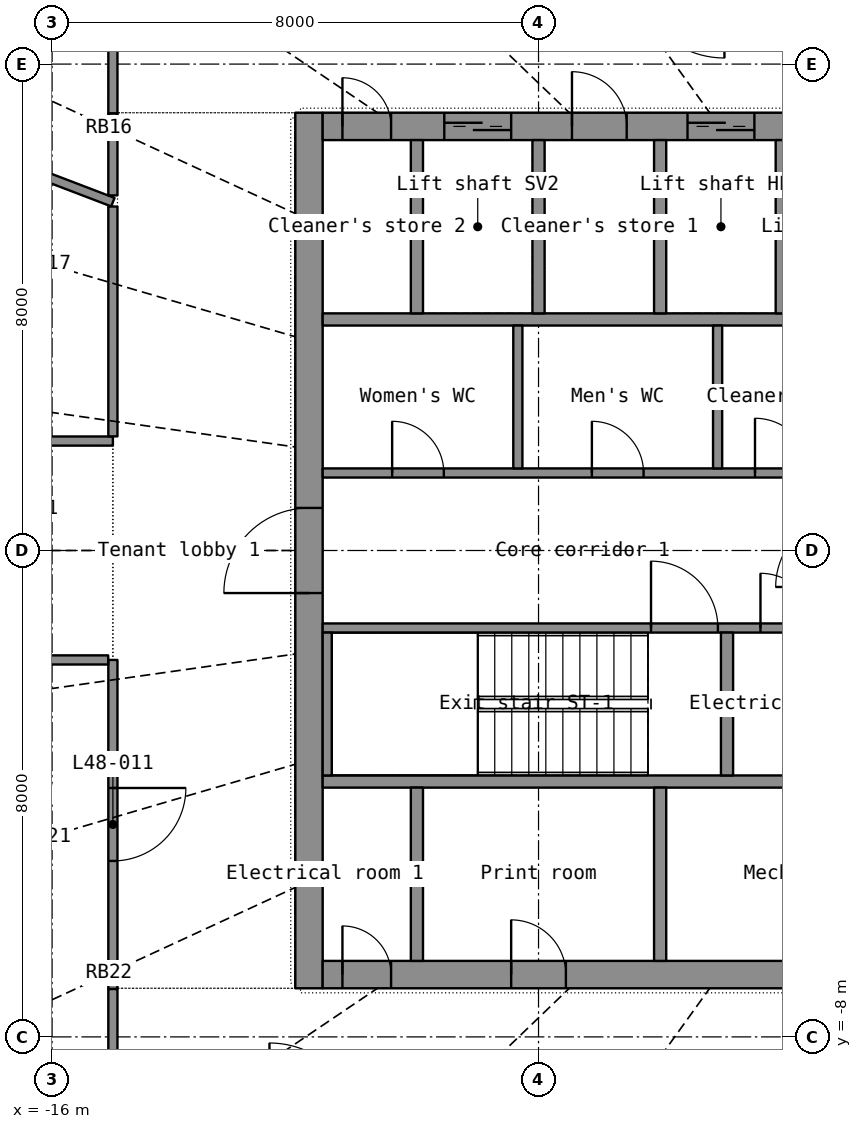
"""IFC4 building model, lengths in metres.
Left out: names, types, materials, properties, quantities, classifications, styles, units other than length and angle.
Written with IfcOpenShell. Run it as: python <this file> out.ifc"""

import sys

from ifc_helpers import new_model, si_unit, direction, frame, frame_2d, origin, place, context, subcontext, project, spatial, rectangle, extrude, element, fill, save


model = new_model("IFC4")
c1 = context("Model", 3, precision=1e-05, world=origin(), true_north=direction((0.0, 1.0)))
c2 = subcontext(c1, "Body", "Model", "MODEL_VIEW")
j1 = project(units=[si_unit("LENGTHUNIT", "METRE"), si_unit("PLANEANGLEUNIT", "RADIAN")], contexts=[c1])
p1 = place(None, origin())
s1 = spatial("IfcSite", under=j1, at=p1, CompositionType="ELEMENT")
p2 = place(p1, origin())
s2 = spatial("IfcBuilding", under=s1, at=p2, CompositionType="ELEMENT")
p3 = place(p2, frame((0.0, 0.0, 197.8)))
s3 = spatial("IfcBuildingStorey", under=s2, at=p3, CompositionType="ELEMENT", Elevation=197.8)
p4 = place(p3, frame((-11.775, -7.2, 0.0), z_axis=(0.0, 0.0, 1.0), x_axis=(0.0, 1.0, 0.0)))
e1 = element("IfcWall", 1, at=p4, inside=s3, PredefinedType="SHEAR", context=c2, shape_type="SweptSolid", body=[
    extrude(rectangle(XDim=14.4, YDim=0.45, at=frame_2d((7.2, 0.0))), origin(), (0.0, 0.0, 1.0), 3.3),
])
p5 = place(p4, frame((6.5, 0.0, 0.0)))
e2 = element("IfcOpeningElement", 2, at=p5, cuts=e1, PredefinedType="OPENING", context=c2, shape_type="SweptSolid", body=[
    extrude(rectangle(XDim=1.4, YDim=2.2, at=frame_2d((0.7, 1.1))), frame((0.0, 0.235, 0.0), z_axis=(0.0, -1.0, 0.0), x_axis=(1.0, 0.0, 0.0)), (0.0, 0.0, 1.0), 0.47),
])
p6 = place(p3, frame((-11.55, -6.975, 0.0), z_axis=(0.0, 0.0, 1.0), x_axis=(1.0, 0.0, 0.0)))
e3 = element("IfcWall", 3, at=p6, inside=s3, PredefinedType="SHEAR", context=c2, shape_type="SweptSolid", body=[
    extrude(rectangle(XDim=23.1, YDim=0.45, at=frame_2d((11.55, 0.0))), origin(), (0.0, 0.0, 1.0), 3.3),
])
p7 = place(p6, frame((20.0, 0.0, 0.0)))
e4 = element("IfcOpeningElement", 4, at=p7, cuts=e3, PredefinedType="OPENING", context=c2, shape_type="SweptSolid", body=[
    extrude(rectangle(XDim=1.1, YDim=2.2, at=frame_2d((0.55, 1.1))), frame((0.0, 0.235, 0.0), z_axis=(0.0, -1.0, 0.0), x_axis=(1.0, 0.0, 0.0)), (0.0, 0.0, 1.0), 0.47),
])
p8 = place(p6, frame((3.1, 0.0, 0.0)))
e5 = element("IfcOpeningElement", 5, at=p8, cuts=e3, PredefinedType="OPENING", context=c2, shape_type="SweptSolid", body=[
    extrude(rectangle(XDim=0.9, YDim=2.1, at=frame_2d((0.45, 1.05))), frame((0.0, 0.235, 0.0), z_axis=(0.0, -1.0, 0.0), x_axis=(1.0, 0.0, 0.0)), (0.0, 0.0, 1.0), 0.47),
])
p9 = place(p6, frame((8.1, 0.0, 0.0)))
e6 = element("IfcOpeningElement", 6, at=p9, cuts=e3, PredefinedType="OPENING", context=c2, shape_type="SweptSolid", body=[
    extrude(rectangle(XDim=0.9, YDim=2.1, at=frame_2d((0.45, 1.05))), frame((0.0, 0.235, 0.0), z_axis=(0.0, -1.0, 0.0), x_axis=(1.0, 0.0, 0.0)), (0.0, 0.0, 1.0), 0.47),
])
p10 = place(p6, frame((15.1, 0.0, 0.0)))
e7 = element("IfcOpeningElement", 7, at=p10, cuts=e3, PredefinedType="OPENING", context=c2, shape_type="SweptSolid", body=[
    extrude(rectangle(XDim=0.9, YDim=2.1, at=frame_2d((0.45, 1.05))), frame((0.0, 0.235, 0.0), z_axis=(0.0, -1.0, 0.0), x_axis=(1.0, 0.0, 0.0)), (0.0, 0.0, 1.0), 0.47),
])
p11 = place(p6, frame((0.325, 0.0, 0.0)))
e8 = element("IfcOpeningElement", 8, at=p11, cuts=e3, PredefinedType="OPENING", context=c2, shape_type="SweptSolid", body=[
    extrude(rectangle(XDim=0.8, YDim=2.05, at=frame_2d((0.4, 1.025))), frame((0.0, 0.235, 0.0), z_axis=(0.0, -1.0, 0.0), x_axis=(1.0, 0.0, 0.0)), (0.0, 0.0, 1.0), 0.47),
])
p12 = place(p6, frame((21.975, 0.0, 0.0)))
e9 = element("IfcOpeningElement", 9, at=p12, cuts=e3, PredefinedType="OPENING", context=c2, shape_type="SweptSolid", body=[
    extrude(rectangle(XDim=0.8, YDim=2.05, at=frame_2d((0.4, 1.025))), frame((0.0, 0.235, 0.0), z_axis=(0.0, -1.0, 0.0), x_axis=(1.0, 0.0, 0.0)), (0.0, 0.0, 1.0), 0.47),
])
p13 = place(p3, frame((-11.55, 6.975, 0.0), z_axis=(0.0, 0.0, 1.0), x_axis=(1.0, 0.0, 0.0)))
e10 = element("IfcWall", 10, at=p13, inside=s3, PredefinedType="SHEAR", context=c2, shape_type="SweptSolid", body=[
    extrude(rectangle(XDim=23.1, YDim=0.45, at=frame_2d((11.55, 0.0))), origin(), (0.0, 0.0, 1.0), 3.3),
])
p14 = place(p13, frame((2.0, 0.0, 0.0)))
e11 = element("IfcOpeningElement", 11, at=p14, cuts=e10, PredefinedType="OPENING", context=c2, shape_type="SweptSolid", body=[
    extrude(rectangle(XDim=1.1, YDim=2.2, at=frame_2d((0.55, 1.1))), frame((0.0, 0.235, 0.0), z_axis=(0.0, -1.0, 0.0), x_axis=(1.0, 0.0, 0.0)), (0.0, 0.0, 1.0), 0.47),
])
p15 = place(p13, frame((6.0, 0.0, 0.0)))
e12 = element("IfcOpeningElement", 12, at=p15, cuts=e10, PredefinedType="OPENING", context=c2, shape_type="SweptSolid", body=[
    extrude(rectangle(XDim=1.1, YDim=2.2, at=frame_2d((0.55, 1.1))), frame((0.0, 0.235, 0.0), z_axis=(0.0, -1.0, 0.0), x_axis=(1.0, 0.0, 0.0)), (0.0, 0.0, 1.0), 0.47),
])
p16 = place(p13, frame((8.0, 0.0, 0.0)))
e13 = element("IfcOpeningElement", 13, at=p16, cuts=e10, PredefinedType="OPENING", context=c2, shape_type="SweptSolid", body=[
    extrude(rectangle(XDim=1.1, YDim=2.2, at=frame_2d((0.55, 1.1))), frame((0.0, 0.235, 0.0), z_axis=(0.0, -1.0, 0.0), x_axis=(1.0, 0.0, 0.0)), (0.0, 0.0, 1.0), 0.47),
])
p17 = place(p13, frame((10.0, 0.0, 0.0)))
e14 = element("IfcOpeningElement", 14, at=p17, cuts=e10, PredefinedType="OPENING", context=c2, shape_type="SweptSolid", body=[
    extrude(rectangle(XDim=1.1, YDim=2.2, at=frame_2d((0.55, 1.1))), frame((0.0, 0.235, 0.0), z_axis=(0.0, -1.0, 0.0), x_axis=(1.0, 0.0, 0.0)), (0.0, 0.0, 1.0), 0.47),
])
p18 = place(p13, frame((12.0, 0.0, 0.0)))
e15 = element("IfcOpeningElement", 15, at=p18, cuts=e10, PredefinedType="OPENING", context=c2, shape_type="SweptSolid", body=[
    extrude(rectangle(XDim=1.1, YDim=2.2, at=frame_2d((0.55, 1.1))), frame((0.0, 0.235, 0.0), z_axis=(0.0, -1.0, 0.0), x_axis=(1.0, 0.0, 0.0)), (0.0, 0.0, 1.0), 0.47),
])
p19 = place(p13, frame((14.0, 0.0, 0.0)))
e16 = element("IfcOpeningElement", 16, at=p19, cuts=e10, PredefinedType="OPENING", context=c2, shape_type="SweptSolid", body=[
    extrude(rectangle(XDim=1.1, YDim=2.2, at=frame_2d((0.55, 1.1))), frame((0.0, 0.235, 0.0), z_axis=(0.0, -1.0, 0.0), x_axis=(1.0, 0.0, 0.0)), (0.0, 0.0, 1.0), 0.47),
])
p20 = place(p13, frame((16.0, 0.0, 0.0)))
e17 = element("IfcOpeningElement", 17, at=p20, cuts=e10, PredefinedType="OPENING", context=c2, shape_type="SweptSolid", body=[
    extrude(rectangle(XDim=1.1, YDim=2.2, at=frame_2d((0.55, 1.1))), frame((0.0, 0.235, 0.0), z_axis=(0.0, -1.0, 0.0), x_axis=(1.0, 0.0, 0.0)), (0.0, 0.0, 1.0), 0.47),
])
p21 = place(p13, frame((18.0, 0.0, 0.0)))
e18 = element("IfcOpeningElement", 18, at=p21, cuts=e10, PredefinedType="OPENING", context=c2, shape_type="SweptSolid", body=[
    extrude(rectangle(XDim=1.1, YDim=2.2, at=frame_2d((0.55, 1.1))), frame((0.0, 0.235, 0.0), z_axis=(0.0, -1.0, 0.0), x_axis=(1.0, 0.0, 0.0)), (0.0, 0.0, 1.0), 0.47),
])
p22 = place(p13, frame((20.0, 0.0, 0.0)))
e19 = element("IfcOpeningElement", 19, at=p22, cuts=e10, PredefinedType="OPENING", context=c2, shape_type="SweptSolid", body=[
    extrude(rectangle(XDim=1.1, YDim=2.2, at=frame_2d((0.55, 1.1))), frame((0.0, 0.235, 0.0), z_axis=(0.0, -1.0, 0.0), x_axis=(1.0, 0.0, 0.0)), (0.0, 0.0, 1.0), 0.47),
])
p23 = place(p13, frame((4.1, 0.0, 0.0)))
e20 = element("IfcOpeningElement", 20, at=p23, cuts=e10, PredefinedType="OPENING", context=c2, shape_type="SweptSolid", body=[
    extrude(rectangle(XDim=0.9, YDim=2.1, at=frame_2d((0.45, 1.05))), frame((0.0, 0.235, 0.0), z_axis=(0.0, -1.0, 0.0), x_axis=(1.0, 0.0, 0.0)), (0.0, 0.0, 1.0), 0.47),
])
p24 = place(p13, frame((0.325, 0.0, 0.0)))
e21 = element("IfcOpeningElement", 21, at=p24, cuts=e10, PredefinedType="OPENING", context=c2, shape_type="SweptSolid", body=[
    extrude(rectangle(XDim=0.8, YDim=2.05, at=frame_2d((0.4, 1.025))), frame((0.0, 0.235, 0.0), z_axis=(0.0, -1.0, 0.0), x_axis=(1.0, 0.0, 0.0)), (0.0, 0.0, 1.0), 0.47),
])
p25 = place(p13, frame((21.975, 0.0, 0.0)))
e22 = element("IfcOpeningElement", 22, at=p25, cuts=e10, PredefinedType="OPENING", context=c2, shape_type="SweptSolid", body=[
    extrude(rectangle(XDim=0.8, YDim=2.05, at=frame_2d((0.4, 1.025))), frame((0.0, 0.235, 0.0), z_axis=(0.0, -1.0, 0.0), x_axis=(1.0, 0.0, 0.0)), (0.0, 0.0, 1.0), 0.47),
])
for number, where, z_axis, x_axis in (
    (23, (-11.55, -3.8, 0.0), (0.0, 0.0, 1.0), (1.0, 0.0, 0.0)),
    (24, (-11.55, 3.8, 0.0), (0.0, 0.0, 1.0), (1.0, 0.0, 0.0)),
):
    element("IfcWall", number, at=place(p3, frame(where, z_axis=z_axis, x_axis=x_axis)), inside=s3, PredefinedType="SHEAR", context=c2, shape_type="SweptSolid", body=[
        extrude(rectangle(XDim=23.1, YDim=0.2, at=frame_2d((11.55, 0.0))), origin(), (0.0, 0.0, 1.0), 3.3),
    ])
p26 = place(p3, frame((-10.0, -6.75, 0.0), z_axis=(0.0, 0.0, 1.0), x_axis=(0.0, 1.0, 0.0)))
e25 = element("IfcWall", 25, at=p26, inside=s3, PredefinedType="SHEAR", context=c2, shape_type="SweptSolid", body=[
    extrude(rectangle(XDim=2.85, YDim=0.2, at=frame_2d((1.425, 0.0))), origin(), (0.0, 0.0, 1.0), 3.3),
])
p27 = place(p3, frame((-6.0, -6.75, 0.0), z_axis=(0.0, 0.0, 1.0), x_axis=(0.0, 1.0, 0.0)))
e26 = element("IfcWall", 26, at=p27, inside=s3, PredefinedType="PARTITIONING", context=c2, shape_type="SweptSolid", body=[
    extrude(rectangle(XDim=2.85, YDim=0.2, at=frame_2d((1.425, 0.0))), origin(), (0.0, 0.0, 1.0), 3.3),
])
for number, where, z_axis, x_axis in (
    (27, (-10.0, 3.9, 0.0), (0.0, 0.0, 1.0), (0.0, 1.0, 0.0)),
    (28, (-8.0, 3.9, 0.0), (0.0, 0.0, 1.0), (0.0, 1.0, 0.0)),
    (29, (-6.0, 3.9, 0.0), (0.0, 0.0, 1.0), (0.0, 1.0, 0.0)),
    (30, (-4.0, 3.9, 0.0), (0.0, 0.0, 1.0), (0.0, 1.0, 0.0)),
):
    element("IfcWall", number, at=place(p3, frame(where, z_axis=z_axis, x_axis=x_axis)), inside=s3, PredefinedType="SHEAR", context=c2, shape_type="SweptSolid", body=[
        extrude(rectangle(XDim=2.85, YDim=0.2, at=frame_2d((1.425, 0.0))), origin(), (0.0, 0.0, 1.0), 3.3),
    ])
p28 = place(p3, frame((-11.55, -1.275, 0.0), z_axis=(0.0, 0.0, 1.0), x_axis=(1.0, 0.0, 0.0)))
e31 = element("IfcWall", 31, at=p28, inside=s3, PredefinedType="SHEAR", context=c2, shape_type="SweptSolid", body=[
    extrude(rectangle(XDim=8.55, YDim=0.15, at=frame_2d((4.275, 0.0))), origin(), (0.0, 0.0, 1.0), 3.3),
])
p29 = place(p28, frame((5.4, 0.0, 0.0)))
e32 = element("IfcOpeningElement", 32, at=p29, cuts=e31, PredefinedType="OPENING", context=c2, shape_type="SweptSolid", body=[
    extrude(rectangle(XDim=1.1, YDim=2.15, at=frame_2d((0.55, 1.075))), frame((0.0, 0.085, 0.0), z_axis=(0.0, -1.0, 0.0), x_axis=(1.0, 0.0, 0.0)), (0.0, 0.0, 1.0), 0.17),
])
p30 = place(p28, frame((7.2, 0.0, 0.0)))
e33 = element("IfcOpeningElement", 33, at=p30, cuts=e31, PredefinedType="OPENING", context=c2, shape_type="SweptSolid", body=[
    extrude(rectangle(XDim=0.9, YDim=2.1, at=frame_2d((0.45, 1.05))), frame((0.0, 0.085, 0.0), z_axis=(0.0, -1.0, 0.0), x_axis=(1.0, 0.0, 0.0)), (0.0, 0.0, 1.0), 0.17),
])
p31 = place(p3, frame((-11.55, 1.275, 0.0), z_axis=(0.0, 0.0, 1.0), x_axis=(1.0, 0.0, 0.0)))
e34 = element("IfcWall", 34, at=p31, inside=s3, PredefinedType="PARTITIONING", context=c2, shape_type="SweptSolid", body=[
    extrude(rectangle(XDim=8.55, YDim=0.15, at=frame_2d((4.275, 0.0))), origin(), (0.0, 0.0, 1.0), 3.3),
])
p32 = place(p31, frame((1.143, 0.0, 0.0)))
e35 = element("IfcOpeningElement", 35, at=p32, cuts=e34, PredefinedType="OPENING", context=c2, shape_type="SweptSolid", body=[
    extrude(rectangle(XDim=0.85, YDim=2.1, at=frame_2d((0.425, 1.05))), frame((0.0, 0.085, 0.0), z_axis=(0.0, -1.0, 0.0), x_axis=(1.0, 0.0, 0.0)), (0.0, 0.0, 1.0), 0.17),
])
p33 = place(p31, frame((4.427, 0.0, 0.0)))
e36 = element("IfcOpeningElement", 36, at=p33, cuts=e34, PredefinedType="OPENING", context=c2, shape_type="SweptSolid", body=[
    extrude(rectangle(XDim=0.85, YDim=2.1, at=frame_2d((0.425, 1.05))), frame((0.0, 0.085, 0.0), z_axis=(0.0, -1.0, 0.0), x_axis=(1.0, 0.0, 0.0)), (0.0, 0.0, 1.0), 0.17),
])
p34 = place(p31, frame((7.11, 0.0, 0.0)))
e37 = element("IfcOpeningElement", 37, at=p34, cuts=e34, PredefinedType="OPENING", context=c2, shape_type="SweptSolid", body=[
    extrude(rectangle(XDim=0.9, YDim=2.1, at=frame_2d((0.45, 1.05))), frame((0.0, 0.085, 0.0), z_axis=(0.0, -1.0, 0.0), x_axis=(1.0, 0.0, 0.0)), (0.0, 0.0, 1.0), 0.17),
])
p35 = place(p3, frame((-11.475, -3.7, 0.0), z_axis=(0.0, 0.0, 1.0), x_axis=(0.0, 1.0, 0.0)))
e38 = element("IfcWall", 38, at=p35, inside=s3, PredefinedType="SHEAR", context=c2, shape_type="SweptSolid", body=[
    extrude(rectangle(XDim=2.35, YDim=0.15, at=frame_2d((1.175, 0.0))), origin(), (0.0, 0.0, 1.0), 3.3),
])
p36 = place(p3, frame((-4.9, -3.7, 0.0), z_axis=(0.0, 0.0, 1.0), x_axis=(0.0, 1.0, 0.0)))
e39 = element("IfcWall", 39, at=p36, inside=s3, PredefinedType="SHEAR", context=c2, shape_type="SweptSolid", body=[
    extrude(rectangle(XDim=2.35, YDim=0.2, at=frame_2d((1.175, 0.0))), origin(), (0.0, 0.0, 1.0), 3.3),
])
for number, where, z_axis, x_axis in (
    (40, (-8.34, 1.35, 0.0), (0.0, 0.0, 1.0), (0.0, 1.0, 0.0)),
    (41, (-5.055, 1.35, 0.0), (0.0, 0.0, 1.0), (0.0, 1.0, 0.0)),
):
    element("IfcWall", number, at=place(p3, frame(where, z_axis=z_axis, x_axis=x_axis)), inside=s3, PredefinedType="PARTITIONING", context=c2, shape_type="SweptSolid", body=[
        extrude(rectangle(XDim=2.35, YDim=0.15, at=frame_2d((1.175, 0.0))), origin(), (0.0, 0.0, 1.0), 3.3),
    ])
p37 = place(p3, frame((-20.515, 7.836, 0.0), z_axis=(0.0, 0.0, 1.0), x_axis=(0.934186062, -0.356786213, 0.0)))
e42 = element("IfcWall", 42, at=p37, inside=s3, PredefinedType="PARTITIONING", context=c2, shape_type="SweptSolid", body=[
    extrude(rectangle(XDim=5.904, YDim=0.15, at=frame_2d((2.952, 0.0))), origin(), (0.0, 0.0, 1.0), 2.4),
])
p38 = place(p3, frame((-15.0, -1.8, 0.0), z_axis=(0.0, 0.0, 1.0), x_axis=(0.0, -1.0, 0.0)))
e43 = element("IfcWall", 43, at=p38, inside=s3, PredefinedType="PARTITIONING", context=c2, shape_type="SweptSolid", body=[
    extrude(rectangle(XDim=5.412, YDim=0.15, at=frame_2d((2.706, 0.0))), origin(), (0.0, 0.0, 1.0), 2.4),
])
p39 = place(p38, frame((2.106, 0.0, 0.0)))
e44 = element("IfcOpeningElement", 44, at=p39, cuts=e43, PredefinedType="OPENING", context=c2, shape_type="SweptSolid", body=[
    extrude(rectangle(XDim=1.2, YDim=2.2, at=frame_2d((0.6, 1.1))), frame((0.0, 0.085, 0.0), z_axis=(0.0, -1.0, 0.0), x_axis=(1.0, 0.0, 0.0)), (0.0, 0.0, 1.0), 0.17),
])
p40 = place(p3, frame((-19.992, -1.8, 0.0), z_axis=(0.0, 0.0, 1.0), x_axis=(1.0, 0.0, 0.0)))
e45 = element("IfcWall", 45, at=p40, inside=s3, PredefinedType="PARTITIONING", context=c2, shape_type="SweptSolid", body=[
    extrude(rectangle(XDim=4.915, YDim=0.15, at=frame_2d((2.458, 0.0))), origin(), (0.0, 0.0, 1.0), 2.4),
])
p41 = place(p3, frame((-15.0, 1.8, 0.0), z_axis=(0.0, 0.0, 1.0), x_axis=(-1.0, 0.0, 0.0)))
e46 = element("IfcWall", 46, at=p41, inside=s3, PredefinedType="PARTITIONING", context=c2, shape_type="SweptSolid", body=[
    extrude(rectangle(XDim=4.992, YDim=0.15, at=frame_2d((2.496, 0.0))), origin(), (0.0, 0.0, 1.0), 2.4),
])
p42 = place(p3, frame((-15.0, 5.657, 0.0), z_axis=(0.0, 0.0, 1.0), x_axis=(0.0, -1.0, 0.0)))
e47 = element("IfcWall", 47, at=p42, inside=s3, PredefinedType="PARTITIONING", context=c2, shape_type="SweptSolid", body=[
    extrude(rectangle(XDim=3.78, YDim=0.15, at=frame_2d((1.89, 0.0))), origin(), (0.0, 0.0, 1.0), 2.4),
])
p43 = place(p3, frame((-15.0, 9.523, 0.0), z_axis=(0.0, 0.0, 1.0), x_axis=(0.0, -1.0, 0.0)))
e48 = element("IfcWall", 48, at=p43, inside=s3, PredefinedType="PARTITIONING", context=c2, shape_type="SweptSolid", body=[
    extrude(rectangle(XDim=2.335, YDim=0.15, at=frame_2d((1.167, 0.0))), origin(), (0.0, 0.0, 1.0), 2.4),
])
p44 = place(p3, frame((-15.0, 7.187, 0.0), z_axis=(0.0, 0.0, 1.0), x_axis=(0.0, -1.0, 0.0)))
e49 = element("IfcWall", 49, at=p44, inside=s3, PredefinedType="PARTITIONING", context=c2, shape_type="SweptSolid", body=[
    extrude(rectangle(XDim=1.347, YDim=0.15, at=frame_2d((0.673, 0.0))), origin(), (0.0, 0.0, 1.0), 2.4),
])
p45 = place(p3, frame((-15.0, -7.213, 0.0), z_axis=(0.0, 0.0, 1.0), x_axis=(0.0, -1.0, 0.0)))
e50 = element("IfcWall", 50, at=p45, inside=s3, PredefinedType="PARTITIONING", context=c2, shape_type="SweptSolid", body=[
    extrude(rectangle(XDim=1.323, YDim=0.15, at=frame_2d((0.662, 0.0))), origin(), (0.0, 0.0, 1.0), 2.4),
])
p46 = place(p8, origin())
e51 = element("IfcDoor", 51, at=p46, inside=s3, OperationType="SINGLE_SWING_LEFT", PredefinedType="DOOR", context=c2, shape_type="SweptSolid", body=[
    extrude(rectangle(XDim=0.9, YDim=2.1, at=frame_2d((0.45, 1.05))), frame((0.0, 0.025, 0.0), z_axis=(0.0, -1.0, 0.0), x_axis=(1.0, 0.0, 0.0)), (0.0, 0.0, 1.0), 0.05),
])
fill(e5, e51)
p47 = place(p11, origin())
e52 = element("IfcDoor", 52, at=p47, inside=s3, OperationType="SINGLE_SWING_LEFT", PredefinedType="DOOR", context=c2, shape_type="SweptSolid", body=[
    extrude(rectangle(XDim=0.8, YDim=2.05, at=frame_2d((0.4, 1.025))), frame((0.0, 0.025, 0.0), z_axis=(0.0, -1.0, 0.0), x_axis=(1.0, 0.0, 0.0)), (0.0, 0.0, 1.0), 0.05),
])
fill(e8, e52)
p48 = place(p14, origin())
e53 = element("IfcDoor", 53, at=p48, inside=s3, OperationType="DOUBLE_DOOR_SLIDING", PredefinedType="DOOR", context=c2, shape_type="SweptSolid", body=[
    extrude(rectangle(XDim=1.1, YDim=2.2, at=frame_2d((0.55, 1.1))), frame((0.0, 0.025, 0.0), z_axis=(0.0, -1.0, 0.0), x_axis=(1.0, 0.0, 0.0)), (0.0, 0.0, 1.0), 0.05),
])
fill(e11, e53)
p49 = place(p15, origin())
e54 = element("IfcDoor", 54, at=p49, inside=s3, OperationType="DOUBLE_DOOR_SLIDING", PredefinedType="DOOR", context=c2, shape_type="SweptSolid", body=[
    extrude(rectangle(XDim=1.1, YDim=2.2, at=frame_2d((0.55, 1.1))), frame((0.0, 0.025, 0.0), z_axis=(0.0, -1.0, 0.0), x_axis=(1.0, 0.0, 0.0)), (0.0, 0.0, 1.0), 0.05),
])
fill(e12, e54)
p50 = place(p23, origin())
e55 = element("IfcDoor", 55, at=p50, inside=s3, OperationType="SINGLE_SWING_LEFT", PredefinedType="DOOR", context=c2, shape_type="SweptSolid", body=[
    extrude(rectangle(XDim=0.9, YDim=2.1, at=frame_2d((0.45, 1.05))), frame((0.0, 0.025, 0.0), z_axis=(0.0, -1.0, 0.0), x_axis=(1.0, 0.0, 0.0)), (0.0, 0.0, 1.0), 0.05),
])
fill(e20, e55)
p51 = place(p24, origin())
e56 = element("IfcDoor", 56, at=p51, inside=s3, OperationType="SINGLE_SWING_LEFT", PredefinedType="DOOR", context=c2, shape_type="SweptSolid", body=[
    extrude(rectangle(XDim=0.8, YDim=2.05, at=frame_2d((0.4, 1.025))), frame((0.0, 0.025, 0.0), z_axis=(0.0, -1.0, 0.0), x_axis=(1.0, 0.0, 0.0)), (0.0, 0.0, 1.0), 0.05),
])
fill(e21, e56)
p52 = place(p5, origin())
e57 = element("IfcDoor", 57, at=p52, inside=s3, OperationType="DOUBLE_DOOR_SINGLE_SWING", PredefinedType="DOOR", context=c2, shape_type="SweptSolid", body=[
    extrude(rectangle(XDim=1.4, YDim=2.2, at=frame_2d((0.7, 1.1))), frame((0.0, 0.025, 0.0), z_axis=(0.0, -1.0, 0.0), x_axis=(1.0, 0.0, 0.0)), (0.0, 0.0, 1.0), 0.05),
])
fill(e2, e57)
p53 = place(p29, origin())
e58 = element("IfcDoor", 58, at=p53, inside=s3, OperationType="SINGLE_SWING_LEFT", PredefinedType="DOOR", context=c2, shape_type="SweptSolid", body=[
    extrude(rectangle(XDim=1.1, YDim=2.15, at=frame_2d((0.55, 1.075))), frame((0.0, 0.025, 0.0), z_axis=(0.0, -1.0, 0.0), x_axis=(1.0, 0.0, 0.0)), (0.0, 0.0, 1.0), 0.05),
])
fill(e32, e58)
p54 = place(p32, origin())
e59 = element("IfcDoor", 59, at=p54, inside=s3, OperationType="SINGLE_SWING_LEFT", PredefinedType="DOOR", context=c2, shape_type="SweptSolid", body=[
    extrude(rectangle(XDim=0.85, YDim=2.1, at=frame_2d((0.425, 1.05))), frame((0.0, 0.025, 0.0), z_axis=(0.0, -1.0, 0.0), x_axis=(1.0, 0.0, 0.0)), (0.0, 0.0, 1.0), 0.05),
])
fill(e35, e59)
p55 = place(p33, origin())
e60 = element("IfcDoor", 60, at=p55, inside=s3, OperationType="SINGLE_SWING_LEFT", PredefinedType="DOOR", context=c2, shape_type="SweptSolid", body=[
    extrude(rectangle(XDim=0.85, YDim=2.1, at=frame_2d((0.425, 1.05))), frame((0.0, 0.025, 0.0), z_axis=(0.0, -1.0, 0.0), x_axis=(1.0, 0.0, 0.0)), (0.0, 0.0, 1.0), 0.05),
])
fill(e36, e60)
p56 = place(p34, origin())
e61 = element("IfcDoor", 61, at=p56, inside=s3, OperationType="SINGLE_SWING_LEFT", PredefinedType="DOOR", context=c2, shape_type="SweptSolid", body=[
    extrude(rectangle(XDim=0.9, YDim=2.1, at=frame_2d((0.45, 1.05))), frame((0.0, 0.025, 0.0), z_axis=(0.0, -1.0, 0.0), x_axis=(1.0, 0.0, 0.0)), (0.0, 0.0, 1.0), 0.05),
])
fill(e37, e61)
p57 = place(p30, origin())
e62 = element("IfcDoor", 62, at=p57, inside=s3, OperationType="SINGLE_SWING_LEFT", PredefinedType="DOOR", context=c2, shape_type="SweptSolid", body=[
    extrude(rectangle(XDim=0.9, YDim=2.1, at=frame_2d((0.45, 1.05))), frame((0.0, 0.025, 0.0), z_axis=(0.0, -1.0, 0.0), x_axis=(1.0, 0.0, 0.0)), (0.0, 0.0, 1.0), 0.05),
])
fill(e33, e62)
p58 = place(p39, origin())
e63 = element("IfcDoor", 63, at=p58, inside=s3, OperationType="DOUBLE_DOOR_SINGLE_SWING", PredefinedType="DOOR", context=c2, shape_type="SweptSolid", body=[
    extrude(rectangle(XDim=1.2, YDim=2.2, at=frame_2d((0.6, 1.1))), frame((0.0, 0.025, 0.0), z_axis=(0.0, -1.0, 0.0), x_axis=(1.0, 0.0, 0.0)), (0.0, 0.0, 1.0), 0.05),
])
fill(e44, e63)
save(model, sys.argv[1])
